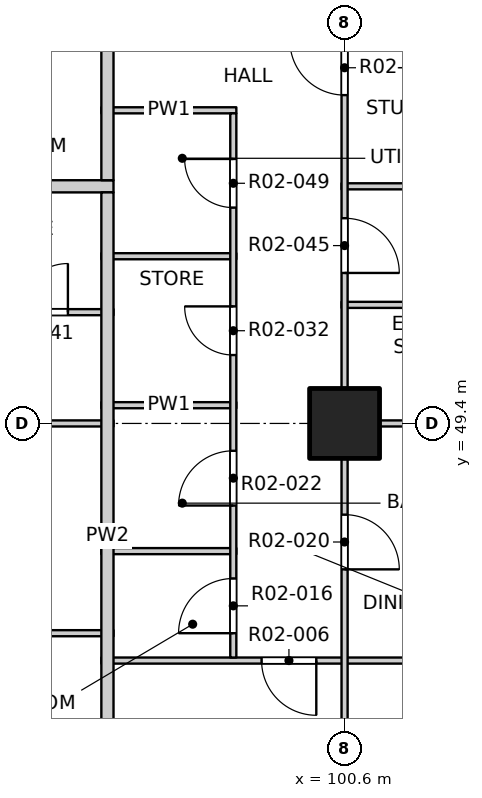
"""IFC4 building model, lengths in metres.
Left out: names, types, materials, properties, quantities, classifications, styles, units other than length and angle.
Written with IfcOpenShell. Run it as: python <this file> out.ifc"""

import sys

from ifc_helpers import new_model, si_unit, direction, frame, frame_2d, origin, origin_2d, place, context, subcontext, project, spatial, rectangle, extrude, element, fill, save


model = new_model("IFC4")
c1 = context("Model", 3, precision=1e-05, world=origin(), true_north=direction((0.0, 1.0)))
c2 = subcontext(c1, "Body", "Model", "MODEL_VIEW")
j1 = project(units=[si_unit("LENGTHUNIT", "METRE"), si_unit("PLANEANGLEUNIT", "RADIAN")], contexts=[c1])
p1 = place(None, origin())
s1 = spatial("IfcSite", under=j1, at=p1, CompositionType="ELEMENT")
p2 = place(p1, origin())
s2 = spatial("IfcBuilding", under=s1, at=p2, CompositionType="ELEMENT")
p3 = place(p2, frame((0.0, 0.0, 29.7)))
s3 = spatial("IfcBuildingStorey", under=s2, at=p3, CompositionType="ELEMENT", Elevation=29.7)
p4 = place(p3, frame((100.6, 49.4, -0.25), z_axis=(0.0, 0.0, 1.0), x_axis=(1.0, 0.0, 0.0)))
e1 = element("IfcColumn", 1, at=p4, inside=s3, PredefinedType="COLUMN", context=c2, shape_type="SweptSolid", body=[
    extrude(rectangle(XDim=1.15, YDim=1.15, at=origin_2d()), origin(), (0.0, 0.0, 1.0), 3.4),
])
p5 = place(p3, frame((96.6, 45.5, 0.0), z_axis=(0.0, 0.0, 1.0), x_axis=(1.0, 0.0, 0.0)))
e2 = element("IfcWall", 2, at=p5, inside=s3, PredefinedType="PARTITIONING", context=c2, shape_type="SweptSolid", body=[
    extrude(rectangle(XDim=11.5, YDim=0.1, at=frame_2d((5.75, 0.0))), origin(), (0.0, 0.0, 1.0), 3.15),
])
p6 = place(p5, frame((2.635, 0.0, 0.0)))
e3 = element("IfcOpeningElement", 3, at=p6, cuts=e2, PredefinedType="OPENING", context=c2, shape_type="SweptSolid", body=[
    extrude(rectangle(XDim=0.9, YDim=2.1, at=frame_2d((0.45, 1.05))), frame((0.0, 0.06, 0.0), z_axis=(0.0, -1.0, 0.0), x_axis=(1.0, 0.0, 0.0)), (0.0, 0.0, 1.0), 0.12),
])
p7 = place(p3, frame((81.0, 45.95, 0.0), z_axis=(0.0, 0.0, 1.0), x_axis=(1.0, 0.0, 0.0)))
e4 = element("IfcWall", 4, at=p7, inside=s3, PredefinedType="PARTITIONING", context=c2, shape_type="SweptSolid", body=[
    extrude(rectangle(XDim=15.8, YDim=0.1, at=frame_2d((7.9, 0.0))), origin(), (0.0, 0.0, 1.0), 3.15),
])
p8 = place(p7, frame((0.625, 0.0, 0.0)))
e5 = element("IfcOpeningElement", 5, at=p8, cuts=e4, PredefinedType="OPENING", context=c2, shape_type="SweptSolid", body=[
    extrude(rectangle(XDim=0.9, YDim=2.1, at=frame_2d((0.45, 1.05))), frame((0.0, 0.06, 0.0), z_axis=(0.0, -1.0, 0.0), x_axis=(1.0, 0.0, 0.0)), (0.0, 0.0, 1.0), 0.12),
])
p9 = place(p7, frame((2.575, 0.0, 0.0)))
e6 = element("IfcOpeningElement", 6, at=p9, cuts=e4, PredefinedType="OPENING", context=c2, shape_type="SweptSolid", body=[
    extrude(rectangle(XDim=0.9, YDim=2.1, at=frame_2d((0.45, 1.05))), frame((0.0, 0.06, 0.0), z_axis=(0.0, -1.0, 0.0), x_axis=(1.0, 0.0, 0.0)), (0.0, 0.0, 1.0), 0.12),
])
p10 = place(p7, frame((5.35, 0.0, 0.0)))
e7 = element("IfcOpeningElement", 7, at=p10, cuts=e4, PredefinedType="OPENING", context=c2, shape_type="SweptSolid", body=[
    extrude(rectangle(XDim=1.2, YDim=2.1, at=frame_2d((0.6, 1.05))), frame((0.0, 0.06, 0.0), z_axis=(0.0, -1.0, 0.0), x_axis=(1.0, 0.0, 0.0)), (0.0, 0.0, 1.0), 0.12),
])
p11 = place(p7, frame((8.425, 0.0, 0.0)))
e8 = element("IfcOpeningElement", 8, at=p11, cuts=e4, PredefinedType="OPENING", context=c2, shape_type="SweptSolid", body=[
    extrude(rectangle(XDim=0.9, YDim=2.1, at=frame_2d((0.45, 1.05))), frame((0.0, 0.06, 0.0), z_axis=(0.0, -1.0, 0.0), x_axis=(1.0, 0.0, 0.0)), (0.0, 0.0, 1.0), 0.12),
])
p12 = place(p7, frame((10.375, 0.0, 0.0)))
e9 = element("IfcOpeningElement", 9, at=p12, cuts=e4, PredefinedType="OPENING", context=c2, shape_type="SweptSolid", body=[
    extrude(rectangle(XDim=0.9, YDim=2.1, at=frame_2d((0.45, 1.05))), frame((0.0, 0.06, 0.0), z_axis=(0.0, -1.0, 0.0), x_axis=(1.0, 0.0, 0.0)), (0.0, 0.0, 1.0), 0.12),
])
p13 = place(p7, frame((13.15, 0.0, 0.0)))
e10 = element("IfcOpeningElement", 10, at=p13, cuts=e4, PredefinedType="OPENING", context=c2, shape_type="SweptSolid", body=[
    extrude(rectangle(XDim=1.2, YDim=2.1, at=frame_2d((0.6, 1.05))), frame((0.0, 0.06, 0.0), z_axis=(0.0, -1.0, 0.0), x_axis=(1.0, 0.0, 0.0)), (0.0, 0.0, 1.0), 0.12),
])
p14 = place(p3, frame((96.6, 47.3, 0.0), z_axis=(0.0, 0.0, 1.0), x_axis=(1.0, 0.0, 0.0)))
e11 = element("IfcWall", 11, at=p14, inside=s3, PredefinedType="PARTITIONING", context=c2, shape_type="SweptSolid", body=[
    extrude(rectangle(XDim=2.22, YDim=0.1, at=frame_2d((1.11, 0.0))), origin(), (0.0, 0.0, 1.0), 3.15),
])
p15 = place(p3, frame((73.2, 49.4, 0.0), z_axis=(0.0, 0.0, 1.0), x_axis=(1.0, 0.0, 0.0)))
e12 = element("IfcWall", 12, at=p15, inside=s3, PredefinedType="PARTITIONING", context=c2, shape_type="SweptSolid", body=[
    extrude(rectangle(XDim=23.6, YDim=0.1, at=frame_2d((11.8, 0.0))), origin(), (0.0, 0.0, 1.0), 3.15),
])
p16 = place(p15, frame((1.6, 0.0, 0.0)))
e13 = element("IfcOpeningElement", 13, at=p16, cuts=e12, PredefinedType="OPENING", context=c2, shape_type="SweptSolid", body=[
    extrude(rectangle(XDim=0.9, YDim=2.1, at=frame_2d((0.45, 1.05))), frame((0.0, 0.06, 0.0), z_axis=(0.0, -1.0, 0.0), x_axis=(1.0, 0.0, 0.0)), (0.0, 0.0, 1.0), 0.12),
])
p17 = place(p15, frame((6.475, 0.0, 0.0)))
e14 = element("IfcOpeningElement", 14, at=p17, cuts=e12, PredefinedType="OPENING", context=c2, shape_type="SweptSolid", body=[
    extrude(rectangle(XDim=0.9, YDim=2.1, at=frame_2d((0.45, 1.05))), frame((0.0, 0.06, 0.0), z_axis=(0.0, -1.0, 0.0), x_axis=(1.0, 0.0, 0.0)), (0.0, 0.0, 1.0), 0.12),
])
p18 = place(p15, frame((10.2, 0.0, 0.0)))
e15 = element("IfcOpeningElement", 15, at=p18, cuts=e12, PredefinedType="OPENING", context=c2, shape_type="SweptSolid", body=[
    extrude(rectangle(XDim=0.9, YDim=2.1, at=frame_2d((0.45, 1.05))), frame((0.0, 0.06, 0.0), z_axis=(0.0, -1.0, 0.0), x_axis=(1.0, 0.0, 0.0)), (0.0, 0.0, 1.0), 0.12),
])
p19 = place(p15, frame((13.3, 0.0, 0.0)))
e16 = element("IfcOpeningElement", 16, at=p19, cuts=e12, PredefinedType="OPENING", context=c2, shape_type="SweptSolid", body=[
    extrude(rectangle(XDim=0.9, YDim=2.1, at=frame_2d((0.45, 1.05))), frame((0.0, 0.06, 0.0), z_axis=(0.0, -1.0, 0.0), x_axis=(1.0, 0.0, 0.0)), (0.0, 0.0, 1.0), 0.12),
])
p20 = place(p15, frame((18.0, 0.0, 0.0)))
e17 = element("IfcOpeningElement", 17, at=p20, cuts=e12, PredefinedType="OPENING", context=c2, shape_type="SweptSolid", body=[
    extrude(rectangle(XDim=0.9, YDim=2.1, at=frame_2d((0.45, 1.05))), frame((0.0, 0.06, 0.0), z_axis=(0.0, -1.0, 0.0), x_axis=(1.0, 0.0, 0.0)), (0.0, 0.0, 1.0), 0.12),
])
p21 = place(p15, frame((21.1, 0.0, 0.0)))
e18 = element("IfcOpeningElement", 18, at=p21, cuts=e12, PredefinedType="OPENING", context=c2, shape_type="SweptSolid", body=[
    extrude(rectangle(XDim=0.9, YDim=2.1, at=frame_2d((0.45, 1.05))), frame((0.0, 0.06, 0.0), z_axis=(0.0, -1.0, 0.0), x_axis=(1.0, 0.0, 0.0)), (0.0, 0.0, 1.0), 0.12),
])
p22 = place(p3, frame((100.55, 49.4, 0.0), z_axis=(0.0, 0.0, 1.0), x_axis=(1.0, 0.0, 0.0)))
e19 = element("IfcWall", 19, at=p22, inside=s3, PredefinedType="PARTITIONING", context=c2, shape_type="SweptSolid", body=[
    extrude(rectangle(XDim=7.55, YDim=0.1, at=frame_2d((3.775, 0.0))), origin(), (0.0, 0.0, 1.0), 2.55),
])
p23 = place(p3, frame((96.6, 49.7, 0.0), z_axis=(0.0, 0.0, 1.0), x_axis=(1.0, 0.0, 0.0)))
e20 = element("IfcWall", 20, at=p23, inside=s3, PredefinedType="PARTITIONING", context=c2, shape_type="SweptSolid", body=[
    extrude(rectangle(XDim=2.22, YDim=0.1, at=frame_2d((1.11, 0.0))), origin(), (0.0, 0.0, 1.0), 3.15),
])
p24 = place(p3, frame((90.9, 51.23, 0.0), z_axis=(0.0, 0.0, 1.0), x_axis=(1.0, 0.0, 0.0)))
e21 = element("IfcWall", 21, at=p24, inside=s3, PredefinedType="PARTITIONING", context=c2, shape_type="SweptSolid", body=[
    extrude(rectangle(XDim=5.9, YDim=0.1, at=frame_2d((2.95, 0.0))), origin(), (0.0, 0.0, 1.0), 3.15),
])
p25 = place(p24, frame((0.5, 0.0, 0.0)))
e22 = element("IfcOpeningElement", 22, at=p25, cuts=e21, PredefinedType="OPENING", context=c2, shape_type="SweptSolid", body=[
    extrude(rectangle(XDim=0.9, YDim=2.1, at=frame_2d((0.45, 1.05))), frame((0.0, 0.06, 0.0), z_axis=(0.0, -1.0, 0.0), x_axis=(1.0, 0.0, 0.0)), (0.0, 0.0, 1.0), 0.12),
])
p26 = place(p24, frame((2.375, 0.0, 0.0)))
e23 = element("IfcOpeningElement", 23, at=p26, cuts=e21, PredefinedType="OPENING", context=c2, shape_type="SweptSolid", body=[
    extrude(rectangle(XDim=0.8, YDim=2.1, at=frame_2d((0.4, 1.05))), frame((0.0, 0.06, 0.0), z_axis=(0.0, -1.0, 0.0), x_axis=(1.0, 0.0, 0.0)), (0.0, 0.0, 1.0), 0.12),
])
p27 = place(p24, frame((4.35, 0.0, 0.0)))
e24 = element("IfcOpeningElement", 24, at=p27, cuts=e21, PredefinedType="OPENING", context=c2, shape_type="SweptSolid", body=[
    extrude(rectangle(XDim=0.8, YDim=2.1, at=frame_2d((0.4, 1.05))), frame((0.0, 0.06, 0.0), z_axis=(0.0, -1.0, 0.0), x_axis=(1.0, 0.0, 0.0)), (0.0, 0.0, 1.0), 0.12),
])
p28 = place(p3, frame((100.55, 51.35, 0.0), z_axis=(0.0, 0.0, 1.0), x_axis=(1.0, 0.0, 0.0)))
e25 = element("IfcWall", 25, at=p28, inside=s3, PredefinedType="PARTITIONING", context=c2, shape_type="SweptSolid", body=[
    extrude(rectangle(XDim=3.55, YDim=0.1, at=frame_2d((1.775, 0.0))), origin(), (0.0, 0.0, 1.0), 3.15),
])
p29 = place(p3, frame((96.6, 52.15, 0.0), z_axis=(0.0, 0.0, 1.0), x_axis=(1.0, 0.0, 0.0)))
e26 = element("IfcWall", 26, at=p29, inside=s3, PredefinedType="PARTITIONING", context=c2, shape_type="SweptSolid", body=[
    extrude(rectangle(XDim=2.22, YDim=0.1, at=frame_2d((1.11, 0.0))), origin(), (0.0, 0.0, 1.0), 3.15),
])
p30 = place(p3, frame((73.2, 53.3, 0.0), z_axis=(0.0, 0.0, 1.0), x_axis=(1.0, 0.0, 0.0)))
e27 = element("IfcWall", 27, at=p30, inside=s3, PredefinedType="PARTITIONING", context=c2, shape_type="SweptSolid", body=[
    extrude(rectangle(XDim=23.6, YDim=0.2, at=frame_2d((11.8, 0.0))), origin(), (0.0, 0.0, 1.0), 3.15),
])
p31 = place(p30, frame((5.925, 0.0, 0.0)))
e28 = element("IfcOpeningElement", 28, at=p31, cuts=e27, PredefinedType="OPENING", context=c2, shape_type="SweptSolid", body=[
    extrude(rectangle(XDim=1.0, YDim=2.1, at=frame_2d((0.5, 1.05))), frame((0.0, 0.11, 0.0), z_axis=(0.0, -1.0, 0.0), x_axis=(1.0, 0.0, 0.0)), (0.0, 0.0, 1.0), 0.22),
])
p32 = place(p30, frame((17.925, 0.0, 0.0)))
e29 = element("IfcOpeningElement", 29, at=p32, cuts=e27, PredefinedType="OPENING", context=c2, shape_type="SweptSolid", body=[
    extrude(rectangle(XDim=1.0, YDim=2.1, at=frame_2d((0.5, 1.05))), frame((0.0, 0.11, 0.0), z_axis=(0.0, -1.0, 0.0), x_axis=(1.0, 0.0, 0.0)), (0.0, 0.0, 1.0), 0.22),
])
p33 = place(p3, frame((100.55, 53.3, 0.0), z_axis=(0.0, 0.0, 1.0), x_axis=(1.0, 0.0, 0.0)))
e30 = element("IfcWall", 30, at=p33, inside=s3, PredefinedType="PARTITIONING", context=c2, shape_type="SweptSolid", body=[
    extrude(rectangle(XDim=7.55, YDim=0.1, at=frame_2d((3.775, 0.0))), origin(), (0.0, 0.0, 1.0), 3.15),
])
p34 = place(p3, frame((96.6, 54.55, 0.0), z_axis=(0.0, 0.0, 1.0), x_axis=(1.0, 0.0, 0.0)))
e31 = element("IfcWall", 31, at=p34, inside=s3, PredefinedType="PARTITIONING", context=c2, shape_type="SweptSolid", body=[
    extrude(rectangle(XDim=2.22, YDim=0.1, at=frame_2d((1.11, 0.0))), origin(), (0.0, 0.0, 1.0), 3.15),
])
p35 = place(p3, frame((96.7, 41.9, 0.0), z_axis=(0.0, 0.0, 1.0), x_axis=(0.0, 1.0, 0.0)))
e32 = element("IfcWall", 32, at=p35, inside=s3, PredefinedType="PARTITIONING", context=c2, shape_type="SweptSolid", body=[
    extrude(rectangle(XDim=11.3, YDim=0.2, at=frame_2d((5.65, 0.0))), origin(), (0.0, 0.0, 1.0), 3.15),
])
p36 = place(p3, frame((96.7, 53.4, 0.0), z_axis=(0.0, 0.0, 1.0), x_axis=(0.0, 1.0, 0.0)))
e33 = element("IfcWall", 33, at=p36, inside=s3, PredefinedType="PARTITIONING", context=c2, shape_type="SweptSolid", body=[
    extrude(rectangle(XDim=31.0, YDim=0.2, at=frame_2d((15.5, 0.0))), origin(), (0.0, 0.0, 1.0), 3.15),
])
p37 = place(p36, frame((2.425, 0.0, 0.0)))
e34 = element("IfcOpeningElement", 34, at=p37, cuts=e33, PredefinedType="OPENING", context=c2, shape_type="SweptSolid", body=[
    extrude(rectangle(XDim=1.0, YDim=2.1, at=frame_2d((0.5, 1.05))), frame((0.0, 0.11, 0.0), z_axis=(0.0, -1.0, 0.0), x_axis=(1.0, 0.0, 0.0)), (0.0, 0.0, 1.0), 0.22),
])
p38 = place(p36, frame((13.375, 0.0, 0.0)))
e35 = element("IfcOpeningElement", 35, at=p38, cuts=e33, PredefinedType="OPENING", context=c2, shape_type="SweptSolid", body=[
    extrude(rectangle(XDim=1.0, YDim=2.1, at=frame_2d((0.5, 1.05))), frame((0.0, 0.11, 0.0), z_axis=(0.0, -1.0, 0.0), x_axis=(1.0, 0.0, 0.0)), (0.0, 0.0, 1.0), 0.22),
])
p39 = place(p36, frame((29.525, 0.0, 0.0)))
e36 = element("IfcOpeningElement", 36, at=p39, cuts=e33, PredefinedType="OPENING", context=c2, shape_type="SweptSolid", body=[
    extrude(rectangle(XDim=1.0, YDim=2.1, at=frame_2d((0.5, 1.05))), frame((0.0, 0.11, 0.0), z_axis=(0.0, -1.0, 0.0), x_axis=(1.0, 0.0, 0.0)), (0.0, 0.0, 1.0), 0.22),
])
p40 = place(p3, frame((98.77, 45.55, 0.0), z_axis=(0.0, 0.0, 1.0), x_axis=(0.0, 1.0, 0.0)))
e37 = element("IfcWall", 37, at=p40, inside=s3, PredefinedType="PARTITIONING", context=c2, shape_type="SweptSolid", body=[
    extrude(rectangle(XDim=8.95, YDim=0.1, at=frame_2d((4.475, 0.0))), origin(), (0.0, 0.0, 1.0), 3.15),
])
p41 = place(p40, frame((0.4, 0.0, 0.0)))
e38 = element("IfcOpeningElement", 38, at=p41, cuts=e37, PredefinedType="OPENING", context=c2, shape_type="SweptSolid", body=[
    extrude(rectangle(XDim=0.9, YDim=2.1, at=frame_2d((0.45, 1.05))), frame((0.0, 0.06, 0.0), z_axis=(0.0, -1.0, 0.0), x_axis=(1.0, 0.0, 0.0)), (0.0, 0.0, 1.0), 0.12),
])
p42 = place(p40, frame((2.5, 0.0, 0.0)))
e39 = element("IfcOpeningElement", 39, at=p42, cuts=e37, PredefinedType="OPENING", context=c2, shape_type="SweptSolid", body=[
    extrude(rectangle(XDim=0.9, YDim=2.1, at=frame_2d((0.45, 1.05))), frame((0.0, 0.06, 0.0), z_axis=(0.0, -1.0, 0.0), x_axis=(1.0, 0.0, 0.0)), (0.0, 0.0, 1.0), 0.12),
])
p43 = place(p40, frame((4.975, 0.0, 0.0)))
e40 = element("IfcOpeningElement", 40, at=p43, cuts=e37, PredefinedType="OPENING", context=c2, shape_type="SweptSolid", body=[
    extrude(rectangle(XDim=0.8, YDim=2.1, at=frame_2d((0.4, 1.05))), frame((0.0, 0.06, 0.0), z_axis=(0.0, -1.0, 0.0), x_axis=(1.0, 0.0, 0.0)), (0.0, 0.0, 1.0), 0.12),
])
p44 = place(p40, frame((7.4, 0.0, 0.0)))
e41 = element("IfcOpeningElement", 41, at=p44, cuts=e37, PredefinedType="OPENING", context=c2, shape_type="SweptSolid", body=[
    extrude(rectangle(XDim=0.8, YDim=2.1, at=frame_2d((0.4, 1.05))), frame((0.0, 0.06, 0.0), z_axis=(0.0, -1.0, 0.0), x_axis=(1.0, 0.0, 0.0)), (0.0, 0.0, 1.0), 0.12),
])
p45 = place(p3, frame((100.6, 41.9, 0.0), z_axis=(0.0, 0.0, 1.0), x_axis=(0.0, 1.0, 0.0)))
e42 = element("IfcWall", 42, at=p45, inside=s3, PredefinedType="PARTITIONING", context=c2, shape_type="SweptSolid", body=[
    extrude(rectangle(XDim=7.5, YDim=0.1, at=frame_2d((3.75, 0.0))), origin(), (0.0, 0.0, 1.0), 2.55),
])
p46 = place(p45, frame((1.2, 0.0, 0.0)))
e43 = element("IfcOpeningElement", 43, at=p46, cuts=e42, PredefinedType="OPENING", context=c2, shape_type="SweptSolid", body=[
    extrude(rectangle(XDim=0.9, YDim=2.1, at=frame_2d((0.45, 1.05))), frame((0.0, 0.06, 0.0), z_axis=(0.0, -1.0, 0.0), x_axis=(1.0, 0.0, 0.0)), (0.0, 0.0, 1.0), 0.12),
])
p47 = place(p45, frame((5.1, 0.0, 0.0)))
e44 = element("IfcOpeningElement", 44, at=p47, cuts=e42, PredefinedType="OPENING", context=c2, shape_type="SweptSolid", body=[
    extrude(rectangle(XDim=0.9, YDim=2.1, at=frame_2d((0.45, 1.05))), frame((0.0, 0.06, 0.0), z_axis=(0.0, -1.0, 0.0), x_axis=(1.0, 0.0, 0.0)), (0.0, 0.0, 1.0), 0.12),
])
p48 = place(p3, frame((100.6, 49.4, 0.0), z_axis=(0.0, 0.0, 1.0), x_axis=(0.0, 1.0, 0.0)))
e45 = element("IfcWall", 45, at=p48, inside=s3, PredefinedType="PARTITIONING", context=c2, shape_type="SweptSolid", body=[
    extrude(rectangle(XDim=31.2, YDim=0.1, at=frame_2d((15.6, 0.0))), origin(), (0.0, 0.0, 1.0), 3.15),
])
p49 = place(p48, frame((2.475, 0.0, 0.0)))
e46 = element("IfcOpeningElement", 46, at=p49, cuts=e45, PredefinedType="OPENING", context=c2, shape_type="SweptSolid", body=[
    extrude(rectangle(XDim=0.9, YDim=2.1, at=frame_2d((0.45, 1.05))), frame((0.0, 0.06, 0.0), z_axis=(0.0, -1.0, 0.0), x_axis=(1.0, 0.0, 0.0)), (0.0, 0.0, 1.0), 0.12),
])
p50 = place(p48, frame((5.4, 0.0, 0.0)))
e47 = element("IfcOpeningElement", 47, at=p50, cuts=e45, PredefinedType="OPENING", context=c2, shape_type="SweptSolid", body=[
    extrude(rectangle(XDim=0.9, YDim=2.1, at=frame_2d((0.45, 1.05))), frame((0.0, 0.06, 0.0), z_axis=(0.0, -1.0, 0.0), x_axis=(1.0, 0.0, 0.0)), (0.0, 0.0, 1.0), 0.12),
])
p51 = place(p48, frame((10.275, 0.0, 0.0)))
e48 = element("IfcOpeningElement", 48, at=p51, cuts=e45, PredefinedType="OPENING", context=c2, shape_type="SweptSolid", body=[
    extrude(rectangle(XDim=0.9, YDim=2.1, at=frame_2d((0.45, 1.05))), frame((0.0, 0.06, 0.0), z_axis=(0.0, -1.0, 0.0), x_axis=(1.0, 0.0, 0.0)), (0.0, 0.0, 1.0), 0.12),
])
p52 = place(p48, frame((14.0, 0.0, 0.0)))
e49 = element("IfcOpeningElement", 49, at=p52, cuts=e45, PredefinedType="OPENING", context=c2, shape_type="SweptSolid", body=[
    extrude(rectangle(XDim=0.9, YDim=2.1, at=frame_2d((0.45, 1.05))), frame((0.0, 0.06, 0.0), z_axis=(0.0, -1.0, 0.0), x_axis=(1.0, 0.0, 0.0)), (0.0, 0.0, 1.0), 0.12),
])
p53 = place(p48, frame((17.1, 0.0, 0.0)))
e50 = element("IfcOpeningElement", 50, at=p53, cuts=e45, PredefinedType="OPENING", context=c2, shape_type="SweptSolid", body=[
    extrude(rectangle(XDim=0.9, YDim=2.1, at=frame_2d((0.45, 1.05))), frame((0.0, 0.06, 0.0), z_axis=(0.0, -1.0, 0.0), x_axis=(1.0, 0.0, 0.0)), (0.0, 0.0, 1.0), 0.12),
])
p54 = place(p48, frame((21.0, 0.0, 0.0)))
e51 = element("IfcOpeningElement", 51, at=p54, cuts=e45, PredefinedType="OPENING", context=c2, shape_type="SweptSolid", body=[
    extrude(rectangle(XDim=0.9, YDim=2.1, at=frame_2d((0.45, 1.05))), frame((0.0, 0.06, 0.0), z_axis=(0.0, -1.0, 0.0), x_axis=(1.0, 0.0, 0.0)), (0.0, 0.0, 1.0), 0.12),
])
p55 = place(p48, frame((25.875, 0.0, 0.0)))
e52 = element("IfcOpeningElement", 52, at=p55, cuts=e45, PredefinedType="OPENING", context=c2, shape_type="SweptSolid", body=[
    extrude(rectangle(XDim=0.9, YDim=2.1, at=frame_2d((0.45, 1.05))), frame((0.0, 0.06, 0.0), z_axis=(0.0, -1.0, 0.0), x_axis=(1.0, 0.0, 0.0)), (0.0, 0.0, 1.0), 0.12),
])
p56 = place(p48, frame((29.6, 0.0, 0.0)))
e53 = element("IfcOpeningElement", 53, at=p56, cuts=e45, PredefinedType="OPENING", context=c2, shape_type="SweptSolid", body=[
    extrude(rectangle(XDim=0.9, YDim=2.1, at=frame_2d((0.45, 1.05))), frame((0.0, 0.06, 0.0), z_axis=(0.0, -1.0, 0.0), x_axis=(1.0, 0.0, 0.0)), (0.0, 0.0, 1.0), 0.12),
])
p57 = place(p6, origin())
e54 = element("IfcDoor", 54, at=p57, inside=s3, OperationType="SINGLE_SWING_LEFT", PredefinedType="DOOR", context=c2, shape_type="SweptSolid", body=[
    extrude(rectangle(XDim=0.9, YDim=2.1, at=frame_2d((0.45, 1.05))), frame((0.0, 0.025, 0.0), z_axis=(0.0, -1.0, 0.0), x_axis=(1.0, 0.0, 0.0)), (0.0, 0.0, 1.0), 0.05),
])
fill(e3, e54)
p58 = place(p41, origin())
e55 = element("IfcDoor", 55, at=p58, inside=s3, OperationType="SINGLE_SWING_LEFT", PredefinedType="DOOR", context=c2, shape_type="SweptSolid", body=[
    extrude(rectangle(XDim=0.9, YDim=2.1, at=frame_2d((0.45, 1.05))), frame((0.0, 0.025, 0.0), z_axis=(0.0, -1.0, 0.0), x_axis=(1.0, 0.0, 0.0)), (0.0, 0.0, 1.0), 0.05),
])
fill(e38, e55)
p59 = place(p47, origin())
e56 = element("IfcDoor", 56, at=p59, inside=s3, OperationType="SINGLE_SWING_RIGHT", PredefinedType="DOOR", context=c2, shape_type="SweptSolid", body=[
    extrude(rectangle(XDim=0.9, YDim=2.1, at=frame_2d((0.45, 1.05))), frame((0.0, 0.025, 0.0), z_axis=(0.0, -1.0, 0.0), x_axis=(1.0, 0.0, 0.0)), (0.0, 0.0, 1.0), 0.05),
])
fill(e44, e56)
p60 = place(p42, origin())
e57 = element("IfcDoor", 57, at=p60, inside=s3, OperationType="SINGLE_SWING_LEFT", PredefinedType="DOOR", context=c2, shape_type="SweptSolid", body=[
    extrude(rectangle(XDim=0.9, YDim=2.1, at=frame_2d((0.45, 1.05))), frame((0.0, 0.025, 0.0), z_axis=(0.0, -1.0, 0.0), x_axis=(1.0, 0.0, 0.0)), (0.0, 0.0, 1.0), 0.05),
])
fill(e39, e57)
p61 = place(p43, origin())
e58 = element("IfcDoor", 58, at=p61, inside=s3, OperationType="SINGLE_SWING_RIGHT", PredefinedType="DOOR", context=c2, shape_type="SweptSolid", body=[
    extrude(rectangle(XDim=0.8, YDim=2.1, at=frame_2d((0.4, 1.05))), frame((0.0, 0.025, 0.0), z_axis=(0.0, -1.0, 0.0), x_axis=(1.0, 0.0, 0.0)), (0.0, 0.0, 1.0), 0.05),
])
fill(e40, e58)
p62 = place(p27, origin())
e59 = element("IfcDoor", 59, at=p62, inside=s3, OperationType="SINGLE_SWING_RIGHT", PredefinedType="DOOR", context=c2, shape_type="SweptSolid", body=[
    extrude(rectangle(XDim=0.8, YDim=2.1, at=frame_2d((0.4, 1.05))), frame((0.0, 0.025, 0.0), z_axis=(0.0, -1.0, 0.0), x_axis=(1.0, 0.0, 0.0)), (0.0, 0.0, 1.0), 0.05),
])
fill(e24, e59)
p63 = place(p49, origin())
e60 = element("IfcDoor", 60, at=p63, inside=s3, OperationType="SINGLE_SWING_RIGHT", PredefinedType="DOOR", context=c2, shape_type="SweptSolid", body=[
    extrude(rectangle(XDim=0.9, YDim=2.1, at=frame_2d((0.45, 1.05))), frame((0.0, 0.025, 0.0), z_axis=(0.0, -1.0, 0.0), x_axis=(1.0, 0.0, 0.0)), (0.0, 0.0, 1.0), 0.05),
])
fill(e46, e60)
p64 = place(p44, origin())
e61 = element("IfcDoor", 61, at=p64, inside=s3, OperationType="SINGLE_SWING_RIGHT", PredefinedType="DOOR", context=c2, shape_type="SweptSolid", body=[
    extrude(rectangle(XDim=0.8, YDim=2.1, at=frame_2d((0.4, 1.05))), frame((0.0, 0.025, 0.0), z_axis=(0.0, -1.0, 0.0), x_axis=(1.0, 0.0, 0.0)), (0.0, 0.0, 1.0), 0.05),
])
fill(e41, e61)
p65 = place(p50, origin())
e62 = element("IfcDoor", 62, at=p65, inside=s3, OperationType="SINGLE_SWING_RIGHT", PredefinedType="DOOR", context=c2, shape_type="SweptSolid", body=[
    extrude(rectangle(XDim=0.9, YDim=2.1, at=frame_2d((0.45, 1.05))), frame((0.0, 0.025, 0.0), z_axis=(0.0, -1.0, 0.0), x_axis=(1.0, 0.0, 0.0)), (0.0, 0.0, 1.0), 0.05),
])
fill(e47, e62)
save(model, sys.argv[1])
